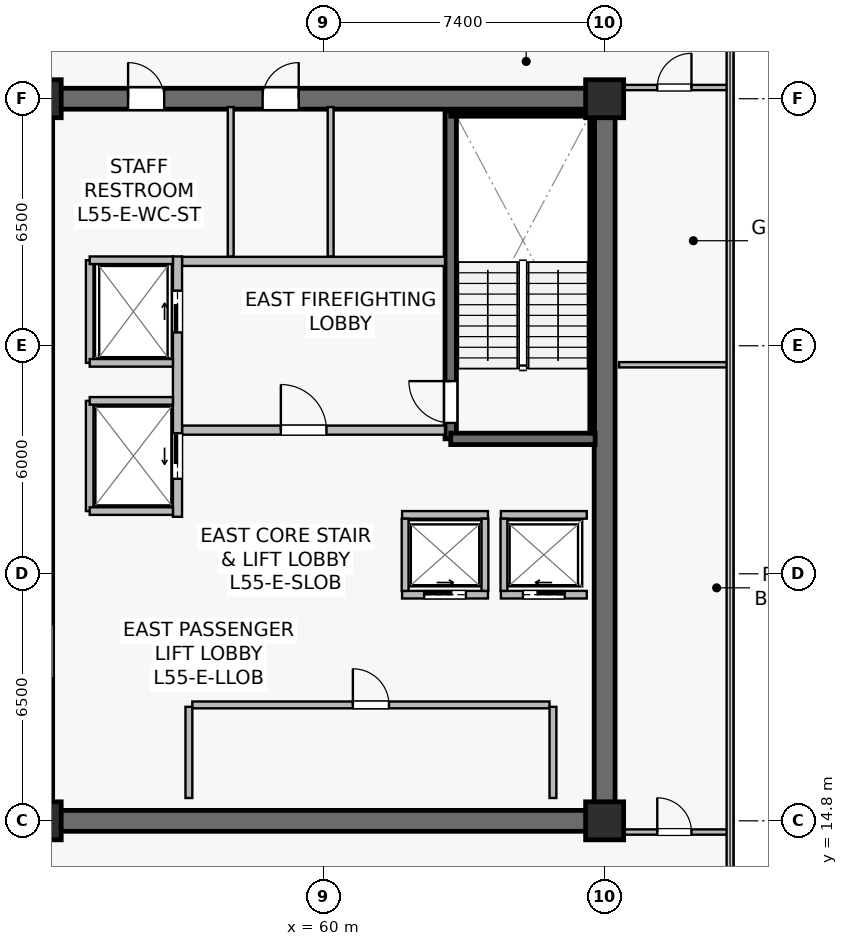
"""IFC4 building model, lengths in metres.
Left out: names, types, materials, properties, quantities, classifications, styles, units other than length and angle.
Written with IfcOpenShell. Run it as: python <this file> out.ifc"""

import sys

from ifc_helpers import new_model, si_unit, direction, frame, frame_2d, origin, origin_2d, place, context, subcontext, project, spatial, rectangle, extrude, source, transform, mapped, element, fill, save


model = new_model("IFC4")
c1 = context("Model", 3, precision=1e-05, world=origin(), true_north=direction((0.0, 1.0)))
c2 = subcontext(c1, "Body", "Model", "MODEL_VIEW")
j1 = project(units=[si_unit("LENGTHUNIT", "METRE"), si_unit("PLANEANGLEUNIT", "RADIAN")], contexts=[c1])
p1 = place(None, origin())
s1 = spatial("IfcSite", under=j1, at=p1, CompositionType="ELEMENT")
p2 = place(p1, origin())
s2 = spatial("IfcBuilding", under=s1, at=p2, CompositionType="ELEMENT")
p3 = place(p2, frame((0.0, 0.0, 230.1)))
s3 = spatial("IfcBuildingStorey", under=s2, at=p3, CompositionType="ELEMENT", Elevation=230.1)
p4 = place(p3, frame((52.325, 14.8, 0.0), z_axis=(0.0, 0.0, 1.0), x_axis=(1.0, 0.0, 0.0)))
e1 = element("IfcWall", 1, at=p4, inside=s3, PredefinedType="SHEAR", context=c2, shape_type="SweptSolid", body=[
    extrude(rectangle(XDim=15.35, YDim=0.55, at=frame_2d((7.675, 0.0))), origin(), (0.0, 0.0, 1.0), 3.8),
])
p5 = place(p3, frame((52.325, 33.8, 0.0), z_axis=(0.0, 0.0, 1.0), x_axis=(1.0, 0.0, 0.0)))
e2 = element("IfcWall", 2, at=p5, inside=s3, PredefinedType="SHEAR", context=c2, shape_type="SweptSolid", body=[
    extrude(rectangle(XDim=15.35, YDim=0.55, at=frame_2d((7.675, 0.0))), origin(), (0.0, 0.0, 1.0), 3.8),
])
p6 = place(p5, frame((6.075, 0.0, 0.0)))
e3 = element("IfcOpeningElement", 3, at=p6, cuts=e2, PredefinedType="OPENING", context=c2, shape_type="SweptSolid", body=[
    extrude(rectangle(XDim=0.95, YDim=2.15, at=frame_2d((0.475, 1.075))), frame((0.0, 0.285, 0.0), z_axis=(0.0, -1.0, 0.0), x_axis=(1.0, 0.0, 0.0)), (0.0, 0.0, 1.0), 0.57),
])
p7 = place(p5, frame((2.535, 0.0, 0.0)))
e4 = element("IfcOpeningElement", 4, at=p7, cuts=e2, PredefinedType="OPENING", context=c2, shape_type="SweptSolid", body=[
    extrude(rectangle(XDim=0.95, YDim=2.15, at=frame_2d((0.475, 1.075))), frame((0.0, 0.285, 0.0), z_axis=(0.0, -1.0, 0.0), x_axis=(1.0, 0.0, 0.0)), (0.0, 0.0, 1.0), 0.57),
])
p8 = place(p3, frame((52.6, 15.075, 0.0), z_axis=(0.0, 0.0, 1.0), x_axis=(0.0, 1.0, 0.0)))
e5 = element("IfcWall", 5, at=p8, inside=s3, PredefinedType="SHEAR", context=c2, shape_type="SweptSolid", body=[
    extrude(rectangle(XDim=18.45, YDim=0.55, at=frame_2d((9.225, 0.0))), origin(), (0.0, 0.0, 1.0), 3.8),
])
p9 = place(p8, frame((3.475, 0.0, 0.0)))
e6 = element("IfcOpeningElement", 6, at=p9, cuts=e5, PredefinedType="OPENING", context=c2, shape_type="SweptSolid", body=[
    extrude(rectangle(XDim=1.42, YDim=2.2, at=frame_2d((0.71, 1.1))), frame((0.0, 0.285, 0.0), z_axis=(0.0, -1.0, 0.0), x_axis=(1.0, 0.0, 0.0)), (0.0, 0.0, 1.0), 0.57),
])
p10 = place(p3, frame((67.4, 15.075, 0.0), z_axis=(0.0, 0.0, 1.0), x_axis=(0.0, 1.0, 0.0)))
e7 = element("IfcWall", 7, at=p10, inside=s3, PredefinedType="SHEAR", context=c2, shape_type="SweptSolid", body=[
    extrude(rectangle(XDim=18.45, YDim=0.55, at=frame_2d((9.225, 0.0))), origin(), (0.0, 0.0, 1.0), 3.8),
])
p11 = place(p3, frame((63.35, 24.85, 0.0), z_axis=(0.0, 0.0, 1.0), x_axis=(0.0, 1.0, 0.0)))
e8 = element("IfcWall", 8, at=p11, inside=s3, PredefinedType="SHEAR", context=c2, shape_type="SweptSolid", body=[
    extrude(rectangle(XDim=8.63, YDim=0.3, at=frame_2d((4.315, 0.0))), origin(), (0.0, 0.0, 1.0), 3.8),
])
p12 = place(p11, frame((0.42, 0.0, 0.0)))
e9 = element("IfcOpeningElement", 9, at=p12, cuts=e8, PredefinedType="OPENING", context=c2, shape_type="SweptSolid", body=[
    extrude(rectangle(XDim=1.1, YDim=2.15, at=frame_2d((0.55, 1.075))), frame((0.0, 0.16, 0.0), z_axis=(0.0, -1.0, 0.0), x_axis=(1.0, 0.0, 0.0)), (0.0, 0.0, 1.0), 0.32),
])
p13 = place(p3, frame((63.35, 24.85, 0.0), z_axis=(0.0, 0.0, 1.0), x_axis=(1.0, 0.0, 0.0)))
e10 = element("IfcWall", 10, at=p13, inside=s3, PredefinedType="SHEAR", context=c2, shape_type="SweptSolid", body=[
    extrude(rectangle(XDim=3.8, YDim=0.3, at=frame_2d((1.9, 0.0))), origin(), (0.0, 0.0, 1.0), 3.8),
])
p14 = place(p3, frame((63.35, 33.4, 0.0), z_axis=(0.0, 0.0, 1.0), x_axis=(1.0, 0.0, 0.0)))
e11 = element("IfcWall", 11, at=p14, inside=s3, PredefinedType="SOLIDWALL", context=c2, shape_type="SweptSolid", body=[
    extrude(rectangle(XDim=3.72, YDim=0.12, at=frame_2d((1.86, 0.0))), origin(), (0.0, 0.0, 1.0), 3.8),
])
p15 = place(p3, frame((67.07, 25.0, 0.0), z_axis=(0.0, 0.0, 1.0), x_axis=(0.0, 1.0, 0.0)))
e12 = element("IfcWall", 12, at=p15, inside=s3, PredefinedType="SOLIDWALL", context=c2, shape_type="SweptSolid", body=[
    extrude(rectangle(XDim=8.32, YDim=0.12, at=frame_2d((4.16, 0.0))), origin(), (0.0, 0.0, 1.0), 3.8),
])
m1 = source(origin(), c2, "Body", "SweptSolid", [
    extrude(rectangle(XDim=1.0, YDim=1.0, at=origin_2d()), origin(), (0.0, 0.0, 1.0), 4.1),
])
for number, where, z_axis, x_axis in (
    (13, (52.6, 14.8, 0.0), (0.0, 0.0, 1.0), (1.0, 0.0, 0.0)),
    (14, (67.4, 14.8, 0.0), (0.0, 0.0, 1.0), (1.0, 0.0, 0.0)),
    (15, (52.6, 33.8, 0.0), (0.0, 0.0, 1.0), (1.0, 0.0, 0.0)),
    (16, (67.4, 33.8, 0.0), (0.0, 0.0, 1.0), (1.0, 0.0, 0.0)),
):
    element("IfcColumn", number, at=place(p3, frame(where, z_axis=z_axis, x_axis=x_axis)), inside=s3, PredefinedType="COLUMN", context=c2, shape_type="MappedRepresentation", body=[
        mapped(m1, transform((0.0, 0.0, 0.0), scale=1.0)),
    ])
p16 = place(p3, frame((56.28, 25.08, 0.0), z_axis=(0.0, 0.0, 1.0), x_axis=(1.0, 0.0, 0.0)))
e17 = element("IfcWall", 17, at=p16, inside=s3, PredefinedType="SOLIDWALL", context=c2, shape_type="SweptSolid", body=[
    extrude(rectangle(XDim=6.92, YDim=0.24, at=frame_2d((3.46, 0.0))), origin(), (0.0, 0.0, 1.0), 3.197),
])
p17 = place(p16, frame((2.6, 0.0, 0.0)))
e18 = element("IfcOpeningElement", 18, at=p17, cuts=e17, PredefinedType="OPENING", context=c2, shape_type="SweptSolid", body=[
    extrude(rectangle(XDim=1.2, YDim=2.16, at=frame_2d((0.6, 1.08))), frame((0.0, 0.13, 0.0), z_axis=(0.0, -1.0, 0.0), x_axis=(1.0, 0.0, 0.0)), (0.0, 0.0, 1.0), 0.26),
])
p18 = place(p3, frame((56.28, 29.52, 0.0), z_axis=(0.0, 0.0, 1.0), x_axis=(1.0, 0.0, 0.0)))
e19 = element("IfcWall", 19, at=p18, inside=s3, PredefinedType="SOLIDWALL", context=c2, shape_type="SweptSolid", body=[
    extrude(rectangle(XDim=6.92, YDim=0.24, at=frame_2d((3.46, 0.0))), origin(), (0.0, 0.0, 1.0), 3.197),
])
p19 = place(p3, frame((56.16, 22.8, 0.0), z_axis=(0.0, 0.0, 1.0), x_axis=(0.0, 1.0, 0.0)))
e20 = element("IfcWall", 20, at=p19, inside=s3, PredefinedType="SOLIDWALL", context=c2, shape_type="SweptSolid", body=[
    extrude(rectangle(XDim=6.85, YDim=0.24, at=frame_2d((3.425, 0.0))), origin(), (0.0, 0.0, 1.0), 2.935),
])
p20 = place(p19, frame((4.85, 0.0, 0.0)))
e21 = element("IfcOpeningElement", 21, at=p20, cuts=e20, PredefinedType="OPENING", context=c2, shape_type="SweptSolid", body=[
    extrude(rectangle(XDim=1.1, YDim=2.22, at=frame_2d((0.55, 1.11))), frame((0.0, 0.13, 0.0), z_axis=(0.0, -1.0, 0.0), x_axis=(1.0, 0.0, 0.0)), (0.0, 0.0, 1.0), 0.26),
])
p21 = place(p19, frame((1.0, 0.0, 0.0)))
e22 = element("IfcOpeningElement", 22, at=p21, cuts=e20, PredefinedType="OPENING", context=c2, shape_type="SweptSolid", body=[
    extrude(rectangle(XDim=1.2, YDim=2.22, at=frame_2d((0.6, 1.11))), frame((0.0, 0.13, 0.0), z_axis=(0.0, -1.0, 0.0), x_axis=(1.0, 0.0, 0.0)), (0.0, 0.0, 1.0), 0.26),
])
p22 = place(p3, frame((64.67, 20.75, 0.0), z_axis=(0.0, 0.0, 1.0), x_axis=(1.0, 0.0, 0.0)))
e23 = element("IfcWall", 23, at=p22, inside=s3, PredefinedType="SOLIDWALL", context=c2, shape_type="SweptSolid", body=[
    extrude(rectangle(XDim=2.26, YDim=0.2, at=frame_2d((1.13, 0.0))), origin(), (0.0, 0.0, 1.0), 3.8),
])
p23 = place(p22, frame((0.58, 0.0, 0.0)))
e24 = element("IfcOpeningElement", 24, at=p23, cuts=e23, PredefinedType="OPENING", context=c2, shape_type="SweptSolid", body=[
    extrude(rectangle(XDim=1.1, YDim=2.22, at=frame_2d((0.55, 1.11))), frame((0.0, 0.11, 0.0), z_axis=(0.0, -1.0, 0.0), x_axis=(1.0, 0.0, 0.0)), (0.0, 0.0, 1.0), 0.22),
])
p24 = place(p3, frame((64.67, 22.85, 0.0), z_axis=(0.0, 0.0, 1.0), x_axis=(1.0, 0.0, 0.0)))
e25 = element("IfcWall", 25, at=p24, inside=s3, PredefinedType="SOLIDWALL", context=c2, shape_type="SweptSolid", body=[
    extrude(rectangle(XDim=2.26, YDim=0.2, at=frame_2d((1.13, 0.0))), origin(), (0.0, 0.0, 1.0), 3.8),
])
p25 = place(p3, frame((64.75, 20.85, 0.0), z_axis=(0.0, 0.0, 1.0), x_axis=(0.0, 1.0, 0.0)))
e26 = element("IfcWall", 26, at=p25, inside=s3, PredefinedType="SOLIDWALL", context=c2, shape_type="SweptSolid", body=[
    extrude(rectangle(XDim=1.9, YDim=0.18, at=frame_2d((0.95, 0.0))), origin(), (0.0, 0.0, 1.0), 3.8),
])
p26 = place(p3, frame((62.07, 20.75, 0.0), z_axis=(0.0, 0.0, 1.0), x_axis=(1.0, 0.0, 0.0)))
e27 = element("IfcWall", 27, at=p26, inside=s3, PredefinedType="SOLIDWALL", context=c2, shape_type="SweptSolid", body=[
    extrude(rectangle(XDim=2.26, YDim=0.2, at=frame_2d((1.13, 0.0))), origin(), (0.0, 0.0, 1.0), 3.8),
])
p27 = place(p26, frame((0.58, 0.0, 0.0)))
e28 = element("IfcOpeningElement", 28, at=p27, cuts=e27, PredefinedType="OPENING", context=c2, shape_type="SweptSolid", body=[
    extrude(rectangle(XDim=1.1, YDim=2.22, at=frame_2d((0.55, 1.11))), frame((0.0, 0.11, 0.0), z_axis=(0.0, -1.0, 0.0), x_axis=(1.0, 0.0, 0.0)), (0.0, 0.0, 1.0), 0.22),
])
p28 = place(p3, frame((62.07, 22.85, 0.0), z_axis=(0.0, 0.0, 1.0), x_axis=(1.0, 0.0, 0.0)))
e29 = element("IfcWall", 29, at=p28, inside=s3, PredefinedType="SOLIDWALL", context=c2, shape_type="SweptSolid", body=[
    extrude(rectangle(XDim=2.26, YDim=0.2, at=frame_2d((1.13, 0.0))), origin(), (0.0, 0.0, 1.0), 3.8),
])
for number, where, z_axis, x_axis in (
    (30, (62.15, 20.85, 0.0), (0.0, 0.0, 1.0), (0.0, 1.0, 0.0)),
    (31, (64.25, 20.85, 0.0), (0.0, 0.0, 1.0), (0.0, 1.0, 0.0)),
):
    element("IfcWall", number, at=place(p3, frame(where, z_axis=z_axis, x_axis=x_axis)), inside=s3, PredefinedType="SOLIDWALL", context=c2, shape_type="SweptSolid", body=[
        extrude(rectangle(XDim=1.9, YDim=0.18, at=frame_2d((0.95, 0.0))), origin(), (0.0, 0.0, 1.0), 3.8),
    ])
p29 = place(p3, frame((53.85, 26.85, 0.0), z_axis=(0.0, 0.0, 1.0), x_axis=(0.0, 1.0, 0.0)))
e32 = element("IfcWall", 32, at=p29, inside=s3, PredefinedType="SOLIDWALL", context=c2, shape_type="SweptSolid", body=[
    extrude(rectangle(XDim=2.7, YDim=0.2, at=frame_2d((1.35, 0.0))), origin(), (0.0, 0.0, 1.0), 3.8),
])
p30 = place(p3, frame((53.85, 29.55, 0.0), z_axis=(0.0, 0.0, 1.0), x_axis=(1.0, 0.0, 0.0)))
e33 = element("IfcWall", 33, at=p30, inside=s3, PredefinedType="SOLIDWALL", context=c2, shape_type="SweptSolid", body=[
    extrude(rectangle(XDim=2.19, YDim=0.2, at=frame_2d((1.095, 0.0))), origin(), (0.0, 0.0, 1.0), 3.8),
])
p31 = place(p3, frame((53.85, 26.85, 0.0), z_axis=(0.0, 0.0, 1.0), x_axis=(1.0, 0.0, 0.0)))
e34 = element("IfcWall", 34, at=p31, inside=s3, PredefinedType="SOLIDWALL", context=c2, shape_type="SweptSolid", body=[
    extrude(rectangle(XDim=2.19, YDim=0.2, at=frame_2d((1.095, 0.0))), origin(), (0.0, 0.0, 1.0), 3.197),
])
p32 = place(p3, frame((53.85, 22.95, 0.0), z_axis=(0.0, 0.0, 1.0), x_axis=(0.0, 1.0, 0.0)))
e35 = element("IfcWall", 35, at=p32, inside=s3, PredefinedType="SOLIDWALL", context=c2, shape_type="SweptSolid", body=[
    extrude(rectangle(XDim=2.9, YDim=0.2, at=frame_2d((1.45, 0.0))), origin(), (0.0, 0.0, 1.0), 2.935),
])
for number, where, z_axis, x_axis in (
    (36, (53.85, 25.85, 0.0), (0.0, 0.0, 1.0), (1.0, 0.0, 0.0)),
    (37, (53.85, 22.95, 0.0), (0.0, 0.0, 1.0), (1.0, 0.0, 0.0)),
):
    element("IfcWall", number, at=place(p3, frame(where, z_axis=z_axis, x_axis=x_axis)), inside=s3, PredefinedType="SOLIDWALL", context=c2, shape_type="SweptSolid", body=[
        extrude(rectangle(XDim=2.19, YDim=0.2, at=frame_2d((1.095, 0.0))), origin(), (0.0, 0.0, 1.0), 3.8),
    ])
p33 = place(p3, frame((56.55, 17.85, 0.0), z_axis=(0.0, 0.0, 1.0), x_axis=(1.0, 0.0, 0.0)))
e38 = element("IfcWall", 38, at=p33, inside=s3, PredefinedType="SOLIDWALL", context=c2, shape_type="SweptSolid", body=[
    extrude(rectangle(XDim=9.4, YDim=0.18, at=frame_2d((4.7, 0.0))), origin(), (0.0, 0.0, 1.0), 3.197),
])
p34 = place(p33, frame((4.225, 0.0, 0.0)))
e39 = element("IfcOpeningElement", 39, at=p34, cuts=e38, PredefinedType="OPENING", context=c2, shape_type="SweptSolid", body=[
    extrude(rectangle(XDim=0.95, YDim=2.15, at=frame_2d((0.475, 1.075))), frame((0.0, 0.1, 0.0), z_axis=(0.0, -1.0, 0.0), x_axis=(1.0, 0.0, 0.0)), (0.0, 0.0, 1.0), 0.2),
])
for number, where, z_axis, x_axis in (
    (40, (56.46, 15.4, 0.0), (0.0, 0.0, 1.0), (0.0, 1.0, 0.0)),
    (41, (66.04, 15.4, 0.0), (0.0, 0.0, 1.0), (0.0, 1.0, 0.0)),
):
    element("IfcWall", number, at=place(p3, frame(where, z_axis=z_axis, x_axis=x_axis)), inside=s3, PredefinedType="SOLIDWALL", context=c2, shape_type="SweptSolid", body=[
        extrude(rectangle(XDim=2.4, YDim=0.18, at=frame_2d((1.2, 0.0))), origin(), (0.0, 0.0, 1.0), 3.8),
    ])
p35 = place(p3, frame((60.19, 29.65, 0.0), z_axis=(0.0, 0.0, 1.0), x_axis=(0.0, 1.0, 0.0)))
e42 = element("IfcWall", 42, at=p35, inside=s3, PredefinedType="PLUMBINGWALL", context=c2, shape_type="SweptSolid", body=[
    extrude(rectangle(XDim=3.93, YDim=0.155, at=frame_2d((1.965, 0.0))), origin(), (0.0, 0.0, 1.0), 3.197),
])
p36 = place(p3, frame((57.56, 29.65, 0.0), z_axis=(0.0, 0.0, 1.0), x_axis=(0.0, 1.0, 0.0)))
e43 = element("IfcWall", 43, at=p36, inside=s3, PredefinedType="PLUMBINGWALL", context=c2, shape_type="SweptSolid", body=[
    extrude(rectangle(XDim=3.93, YDim=0.155, at=frame_2d((1.965, 0.0))), origin(), (0.0, 0.0, 1.0), 3.8),
])
p37 = place(p3, frame((67.78, 26.8, 0.0), z_axis=(0.0, 0.0, 1.0), x_axis=(1.0, 0.0, 0.0)))
e44 = element("IfcWall", 44, at=p37, inside=s3, PredefinedType="PARTITIONING", context=c2, shape_type="SweptSolid", body=[
    extrude(rectangle(XDim=2.91, YDim=0.14, at=frame_2d((1.455, 0.0))), origin(), (0.0, 0.0, 1.0), 3.8),
])
p38 = place(p3, frame((67.78, 14.505, 0.0), z_axis=(0.0, 0.0, 1.0), x_axis=(1.0, 0.0, 0.0)))
e45 = element("IfcWall", 45, at=p38, inside=s3, PredefinedType="PARTITIONING", context=c2, shape_type="SweptSolid", body=[
    extrude(rectangle(XDim=2.91, YDim=0.14, at=frame_2d((1.455, 0.0))), origin(), (0.0, 0.0, 1.0), 3.8),
])
p39 = place(p38, frame((1.005, 0.0, 0.0)))
e46 = element("IfcOpeningElement", 46, at=p39, cuts=e45, PredefinedType="OPENING", context=c2, shape_type="SweptSolid", body=[
    extrude(rectangle(XDim=0.9, YDim=2.1, at=frame_2d((0.45, 1.05))), frame((0.0, 0.08, 0.0), z_axis=(0.0, -1.0, 0.0), x_axis=(1.0, 0.0, 0.0)), (0.0, 0.0, 1.0), 0.16),
])
p40 = place(p3, frame((67.78, 34.095, 0.0), z_axis=(0.0, 0.0, 1.0), x_axis=(1.0, 0.0, 0.0)))
e47 = element("IfcWall", 47, at=p40, inside=s3, PredefinedType="PARTITIONING", context=c2, shape_type="SweptSolid", body=[
    extrude(rectangle(XDim=2.91, YDim=0.14, at=frame_2d((1.455, 0.0))), origin(), (0.0, 0.0, 1.0), 3.8),
])
p41 = place(p40, frame((1.005, 0.0, 0.0)))
e48 = element("IfcOpeningElement", 48, at=p41, cuts=e47, PredefinedType="OPENING", context=c2, shape_type="SweptSolid", body=[
    extrude(rectangle(XDim=0.9, YDim=2.1, at=frame_2d((0.45, 1.05))), frame((0.0, 0.08, 0.0), z_axis=(0.0, -1.0, 0.0), x_axis=(1.0, 0.0, 0.0)), (0.0, 0.0, 1.0), 0.16),
])
m2 = source(origin(), c2, "Body", "SweptSolid", [
    extrude(rectangle(XDim=1.1, YDim=2.15, at=frame_2d((0.55, 1.075))), frame((0.0, 0.025, 0.0), z_axis=(0.0, -1.0, 0.0), x_axis=(1.0, 0.0, 0.0)), (0.0, 0.0, 1.0), 0.05),
])
p42 = place(p12, origin())
e49 = element("IfcDoor", 49, at=p42, inside=s3, OperationType="SINGLE_SWING_RIGHT", PredefinedType="DOOR", context=c2, shape_type="MappedRepresentation", body=[
    mapped(m2, transform((0.0, 0.0, 0.0), scale=1.0)),
])
fill(e9, e49)
m3 = source(origin(), c2, "Body", "SweptSolid", [
    extrude(rectangle(XDim=1.2, YDim=2.16, at=frame_2d((0.6, 1.08))), frame((0.0, 0.025, 0.0), z_axis=(0.0, -1.0, 0.0), x_axis=(1.0, 0.0, 0.0)), (0.0, 0.0, 1.0), 0.05),
])
p43 = place(p17, origin())
e50 = element("IfcDoor", 50, at=p43, inside=s3, OperationType="SINGLE_SWING_LEFT", PredefinedType="DOOR", context=c2, shape_type="MappedRepresentation", body=[
    mapped(m3, transform((0.0, 0.0, 0.0), scale=1.0)),
])
fill(e18, e50)
m4 = source(origin(), c2, "Body", "SweptSolid", [
    extrude(rectangle(XDim=1.1, YDim=2.22, at=frame_2d((0.55, 1.11))), frame((0.0, 0.025, 0.0), z_axis=(0.0, -1.0, 0.0), x_axis=(1.0, 0.0, 0.0)), (0.0, 0.0, 1.0), 0.05),
])
p44 = place(p23, origin())
e51 = element("IfcDoor", 51, at=p44, inside=s3, OperationType="SLIDING_TO_LEFT", PredefinedType="USERDEFINED", context=c2, shape_type="MappedRepresentation", body=[
    mapped(m4, transform((0.0, 0.0, 0.0), scale=1.0)),
])
fill(e24, e51)
p45 = place(p27, origin())
e52 = element("IfcDoor", 52, at=p45, inside=s3, OperationType="SLIDING_TO_RIGHT", PredefinedType="USERDEFINED", context=c2, shape_type="MappedRepresentation", body=[
    mapped(m4, transform((0.0, 0.0, 0.0), scale=1.0)),
])
fill(e28, e52)
p46 = place(p20, origin())
e53 = element("IfcDoor", 53, at=p46, inside=s3, OperationType="SLIDING_TO_RIGHT", PredefinedType="USERDEFINED", context=c2, shape_type="MappedRepresentation", body=[
    mapped(m4, transform((0.0, 0.0, 0.0), scale=1.0)),
])
fill(e21, e53)
m5 = source(origin(), c2, "Body", "SweptSolid", [
    extrude(rectangle(XDim=1.2, YDim=2.22, at=frame_2d((0.6, 1.11))), frame((0.0, 0.025, 0.0), z_axis=(0.0, -1.0, 0.0), x_axis=(1.0, 0.0, 0.0)), (0.0, 0.0, 1.0), 0.05),
])
p47 = place(p21, origin())
e54 = element("IfcDoor", 54, at=p47, inside=s3, OperationType="SLIDING_TO_LEFT", PredefinedType="USERDEFINED", context=c2, shape_type="MappedRepresentation", body=[
    mapped(m5, transform((0.0, 0.0, 0.0), scale=1.0)),
])
fill(e22, e54)
m6 = source(origin(), c2, "Body", "SweptSolid", [
    extrude(rectangle(XDim=0.95, YDim=2.15, at=frame_2d((0.475, 1.075))), frame((0.0, 0.025, 0.0), z_axis=(0.0, -1.0, 0.0), x_axis=(1.0, 0.0, 0.0)), (0.0, 0.0, 1.0), 0.05),
])
p48 = place(p34, origin())
e55 = element("IfcDoor", 55, at=p48, inside=s3, OperationType="SINGLE_SWING_LEFT", PredefinedType="DOOR", context=c2, shape_type="MappedRepresentation", body=[
    mapped(m6, transform((0.0, 0.0, 0.0), scale=1.0)),
])
fill(e39, e55)
p49 = place(p6, origin())
e56 = element("IfcDoor", 56, at=p49, inside=s3, OperationType="SINGLE_SWING_RIGHT", PredefinedType="DOOR", context=c2, shape_type="MappedRepresentation", body=[
    mapped(m6, transform((0.0, 0.0, 0.0), scale=1.0)),
])
fill(e3, e56)
p50 = place(p7, origin())
e57 = element("IfcDoor", 57, at=p50, inside=s3, OperationType="SINGLE_SWING_LEFT", PredefinedType="DOOR", context=c2, shape_type="MappedRepresentation", body=[
    mapped(m6, transform((0.0, 0.0, 0.0), scale=1.0)),
])
fill(e4, e57)
m7 = source(origin(), c2, "Body", "SweptSolid", [
    extrude(rectangle(XDim=0.9, YDim=2.1, at=frame_2d((0.45, 1.05))), frame((0.0, 0.025, 0.0), z_axis=(0.0, -1.0, 0.0), x_axis=(1.0, 0.0, 0.0)), (0.0, 0.0, 1.0), 0.05),
])
p51 = place(p39, origin())
e58 = element("IfcDoor", 58, at=p51, inside=s3, OperationType="SINGLE_SWING_LEFT", PredefinedType="DOOR", context=c2, shape_type="MappedRepresentation", body=[
    mapped(m7, transform((0.0, 0.0, 0.0), scale=1.0)),
])
fill(e46, e58)
p52 = place(p41, origin())
e59 = element("IfcDoor", 59, at=p52, inside=s3, OperationType="SINGLE_SWING_RIGHT", PredefinedType="DOOR", context=c2, shape_type="MappedRepresentation", body=[
    mapped(m7, transform((0.0, 0.0, 0.0), scale=1.0)),
])
fill(e48, e59)
save(model, sys.argv[1])
